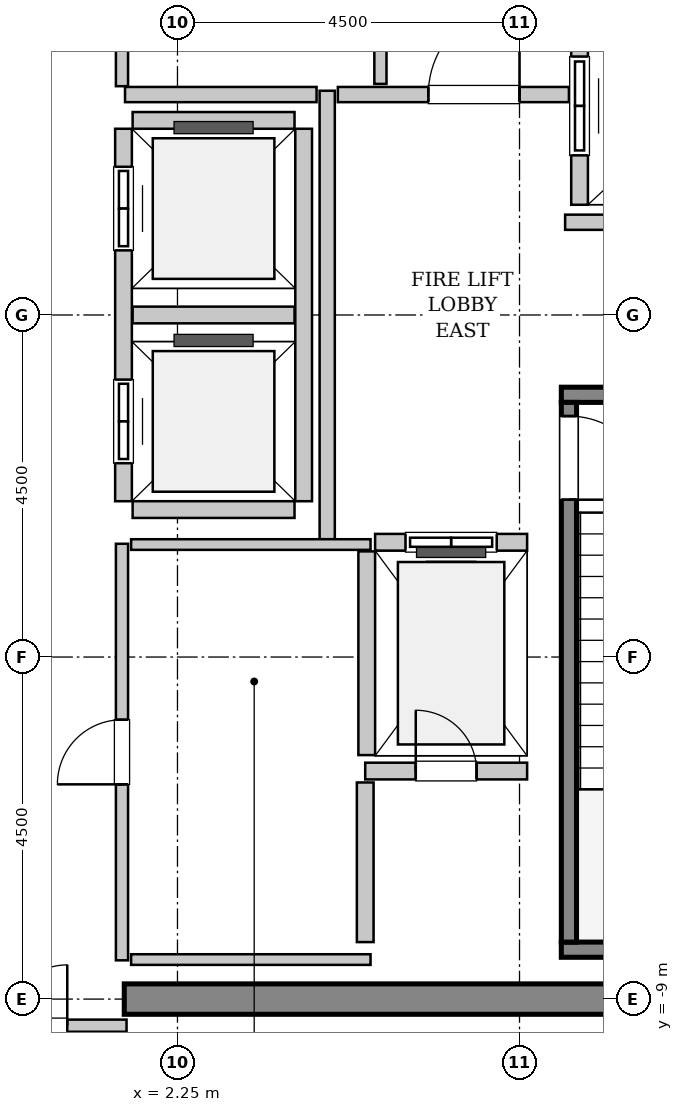
"""IFC4 building model, lengths in metres.
Left out: names, types, materials, properties, quantities, classifications, styles, units other than length and angle.
Written with IfcOpenShell. Run it as: python <this file> out.ifc"""

import sys

from ifc_helpers import new_model, si_unit, direction, frame, frame_2d, origin, place, context, subcontext, project, spatial, rectangle, extrude, source, transform, mapped, element, fill, save


model = new_model("IFC4")
c1 = context("Model", 3, precision=1e-05, world=origin(), true_north=direction((0.0, 1.0)))
c2 = subcontext(c1, "Body", "Model", "MODEL_VIEW")
j1 = project(units=[si_unit("LENGTHUNIT", "METRE"), si_unit("PLANEANGLEUNIT", "RADIAN")], contexts=[c1])
p1 = place(None, origin())
s1 = spatial("IfcSite", under=j1, at=p1, CompositionType="ELEMENT")
p2 = place(p1, origin())
s2 = spatial("IfcBuilding", under=s1, at=p2, CompositionType="ELEMENT")
p3 = place(p2, frame((0.0, 0.0, 353.8)))
s3 = spatial("IfcBuildingStorey", under=s2, at=p3, CompositionType="ELEMENT", Elevation=353.8)
m1 = source(origin(), c2, "Body", "SweptSolid", [
    extrude(rectangle(XDim=9.9, YDim=0.4, at=frame_2d((4.95, 0.0))), origin(), (0.0, 0.0, 1.0), 4.8),
])
p4 = place(p3, frame((1.55, -9.0, 0.0), z_axis=(0.0, 0.0, 1.0), x_axis=(1.0, 0.0, 0.0)))
e1 = element("IfcWall", 1, at=p4, inside=s3, PredefinedType="SHEAR", context=c2, shape_type="MappedRepresentation", body=[
    mapped(m1, transform((0.0, 0.0, 0.0), x_axis=(1.0, 0.0, 0.0), y_axis=(0.0, 1.0, 0.0), z_axis=(0.0, 0.0, 1.0), scale=1.0)),
])
m2 = source(origin(), c2, "Body", "SweptSolid", [
    extrude(rectangle(XDim=3.4, YDim=0.2, at=frame_2d((1.7, 0.0))), origin(), (0.0, 0.0, 1.0), 4.8),
])
p5 = place(p3, frame((7.3, -1.05, 0.0), z_axis=(0.0, 0.0, 1.0), x_axis=(1.0, 0.0, 0.0)))
e2 = element("IfcWall", 2, at=p5, inside=s3, PredefinedType="SOLIDWALL", context=c2, shape_type="MappedRepresentation", body=[
    mapped(m2, transform((0.0, 0.0, 0.0), x_axis=(1.0, 0.0, 0.0), y_axis=(0.0, 1.0, 0.0), z_axis=(0.0, 0.0, 1.0), scale=1.0)),
])
m3 = source(origin(), c2, "Body", "SweptSolid", [
    extrude(rectangle(XDim=3.755, YDim=0.2, at=frame_2d((1.877, 0.0))), origin(), (0.0, 0.0, 1.0), 4.8),
])
p6 = place(p3, frame((7.3, -8.35, 0.0), z_axis=(0.0, 0.0, 1.0), x_axis=(1.0, 0.0, 0.0)))
e3 = element("IfcWall", 3, at=p6, inside=s3, PredefinedType="SOLIDWALL", context=c2, shape_type="MappedRepresentation", body=[
    mapped(m3, transform((0.0, 0.0, 0.0), x_axis=(1.0, 0.0, 0.0), y_axis=(0.0, 1.0, 0.0), z_axis=(0.0, 0.0, 1.0), scale=1.0)),
])
m4 = source(origin(), c2, "Body", "SweptSolid", [
    extrude(rectangle(XDim=7.1, YDim=0.2, at=frame_2d((3.55, 0.0))), origin(), (0.0, 0.0, 1.0), 4.8),
])
p7 = place(p3, frame((7.4, -1.15, 0.0), z_axis=(0.0, 0.0, 1.0), x_axis=(0.0, -1.0, 0.0)))
e4 = element("IfcWall", 4, at=p7, inside=s3, PredefinedType="SOLIDWALL", context=c2, shape_type="MappedRepresentation", body=[
    mapped(m4, transform((0.0, 0.0, 0.0), x_axis=(1.0, 0.0, 0.0), y_axis=(0.0, 1.0, 0.0), z_axis=(0.0, 0.0, 1.0), scale=1.0)),
])
p8 = place(p7, frame((0.18, 0.0, 0.0)))
e5 = element("IfcOpeningElement", 5, at=p8, cuts=e4, PredefinedType="OPENING", context=c2, shape_type="SweptSolid", body=[
    extrude(rectangle(XDim=1.1, YDim=2.15, at=frame_2d((0.55, 1.075))), frame((0.0, 0.11, 0.0), z_axis=(0.0, -1.0, 0.0), x_axis=(1.0, 0.0, 0.0)), (0.0, 0.0, 1.0), 0.22),
])
m5 = source(origin(), c2, "Body", "SweptSolid", [
    extrude(rectangle(XDim=2.0, YDim=0.22, at=frame_2d((1.0, 0.0))), origin(), (0.0, 0.0, 1.0), 4.485),
])
p9 = place(p3, frame((6.85, -2.99, 0.0), z_axis=(0.0, 0.0, 1.0), x_axis=(-1.0, 0.0, 0.0)))
e6 = element("IfcWall", 6, at=p9, inside=s3, PredefinedType="SOLIDWALL", context=c2, shape_type="MappedRepresentation", body=[
    mapped(m5, transform((0.0, 0.0, 0.0), x_axis=(1.0, 0.0, 0.0), y_axis=(0.0, 1.0, 0.0), z_axis=(0.0, 0.0, 1.0), scale=1.0)),
])
p10 = place(p9, frame((0.4, 0.0, 0.0)))
e7 = element("IfcOpeningElement", 7, at=p10, cuts=e6, PredefinedType="OPENING", context=c2, shape_type="SweptSolid", body=[
    extrude(rectangle(XDim=1.2, YDim=2.2, at=frame_2d((0.6, 1.1))), frame((0.0, 0.12, 0.0), z_axis=(0.0, -1.0, 0.0), x_axis=(1.0, 0.0, 0.0)), (0.0, 0.0, 1.0), 0.24),
])
m6 = source(origin(), c2, "Body", "SweptSolid", [
    extrude(rectangle(XDim=2.68, YDim=0.22, at=frame_2d((1.34, 0.0))), origin(), (0.0, 0.0, 1.0), 4.485),
])
p11 = place(p3, frame((4.74, -3.11, 0.0), z_axis=(0.0, 0.0, 1.0), x_axis=(0.0, -1.0, 0.0)))
e8 = element("IfcWall", 8, at=p11, inside=s3, PredefinedType="SOLIDWALL", context=c2, shape_type="MappedRepresentation", body=[
    mapped(m6, transform((0.0, 0.0, 0.0), x_axis=(1.0, 0.0, 0.0), y_axis=(0.0, 1.0, 0.0), z_axis=(0.0, 0.0, 1.0), scale=1.0)),
])
m7 = source(origin(), c2, "Body", "SweptSolid", [
    extrude(rectangle(XDim=5.45, YDim=0.22, at=frame_2d((2.725, 0.0))), origin(), (0.0, 0.0, 1.0), 4.485),
])
p12 = place(p3, frame((7.54, 6.9, 0.0), z_axis=(0.0, 0.0, 1.0), x_axis=(0.0, -1.0, 0.0)))
e9 = element("IfcWall", 9, at=p12, inside=s3, PredefinedType="SOLIDWALL", context=c2, shape_type="MappedRepresentation", body=[
    mapped(m7, transform((0.0, 0.0, 0.0), x_axis=(1.0, 0.0, 0.0), y_axis=(0.0, 1.0, 0.0), z_axis=(0.0, 0.0, 1.0), scale=1.0)),
])
p13 = place(p12, frame((3.5, 0.0, 0.0)))
e10 = element("IfcOpeningElement", 10, at=p13, cuts=e9, PredefinedType="OPENING", context=c2, shape_type="SweptSolid", body=[
    extrude(rectangle(XDim=1.3, YDim=2.3, at=frame_2d((0.65, 1.15))), frame((0.0, 0.12, 0.0), z_axis=(0.0, -1.0, 0.0), x_axis=(1.0, 0.0, 0.0)), (0.0, 0.0, 1.0), 0.24),
])
p14 = place(p12, frame((0.65, 0.0, 0.0)))
e11 = element("IfcOpeningElement", 11, at=p14, cuts=e9, PredefinedType="OPENING", context=c2, shape_type="SweptSolid", body=[
    extrude(rectangle(XDim=1.3, YDim=2.3, at=frame_2d((0.65, 1.15))), frame((0.0, 0.12, 0.0), z_axis=(0.0, -1.0, 0.0), x_axis=(1.0, 0.0, 0.0)), (0.0, 0.0, 1.0), 0.24),
])
m8 = source(origin(), c2, "Body", "SweptSolid", [
    extrude(rectangle(XDim=4.9, YDim=0.22, at=frame_2d((2.45, 0.0))), origin(), (0.0, 0.0, 1.0), 4.485),
])
p15 = place(p3, frame((1.54, 2.45, 0.0), z_axis=(0.0, 0.0, 1.0), x_axis=(0.0, -1.0, 0.0)))
e12 = element("IfcWall", 12, at=p15, inside=s3, PredefinedType="SOLIDWALL", context=c2, shape_type="MappedRepresentation", body=[
    mapped(m8, transform((0.0, 0.0, 0.0), x_axis=(1.0, 0.0, 0.0), y_axis=(0.0, 1.0, 0.0), z_axis=(0.0, 0.0, 1.0), scale=1.0)),
])
p16 = place(p15, frame((3.3, 0.0, 0.0)))
e13 = element("IfcOpeningElement", 13, at=p16, cuts=e12, PredefinedType="OPENING", context=c2, shape_type="SweptSolid", body=[
    extrude(rectangle(XDim=1.1, YDim=2.2, at=frame_2d((0.55, 1.1))), frame((0.0, 0.12, 0.0), z_axis=(0.0, -1.0, 0.0), x_axis=(1.0, 0.0, 0.0)), (0.0, 0.0, 1.0), 0.24),
])
p17 = place(p15, frame((0.5, 0.0, 0.0)))
e14 = element("IfcOpeningElement", 14, at=p17, cuts=e12, PredefinedType="OPENING", context=c2, shape_type="SweptSolid", body=[
    extrude(rectangle(XDim=1.1, YDim=2.2, at=frame_2d((0.55, 1.1))), frame((0.0, 0.12, 0.0), z_axis=(0.0, -1.0, 0.0), x_axis=(1.0, 0.0, 0.0)), (0.0, 0.0, 1.0), 0.24),
])
p18 = place(p3, frame((3.91, -2.45, 0.0), z_axis=(0.0, 0.0, 1.0), x_axis=(0.0, 1.0, 0.0)))
e15 = element("IfcWall", 15, at=p18, inside=s3, PredefinedType="SOLIDWALL", context=c2, shape_type="MappedRepresentation", body=[
    mapped(m8, transform((0.0, 0.0, 0.0), x_axis=(1.0, 0.0, 0.0), y_axis=(0.0, 1.0, 0.0), z_axis=(0.0, 0.0, 1.0), scale=1.0)),
])
m9 = source(origin(), c2, "Body", "SweptSolid", [
    extrude(rectangle(XDim=2.13, YDim=0.22, at=frame_2d((1.065, 0.0))), origin(), (0.0, 0.0, 1.0), 4.485),
])
for number, where, z_axis, x_axis in (
    (16, (1.66, -2.56, 0.0), (0.0, 0.0, 1.0), (1.0, 0.0, 0.0)),
    (17, (1.66, 0.0, 0.0), (0.0, 0.0, 1.0), (1.0, 0.0, 0.0)),
    (18, (3.79, 2.56, 0.0), (0.0, 0.0, 1.0), (-1.0, 0.0, 0.0)),
):
    element("IfcWall", number, at=place(p3, frame(where, z_axis=z_axis, x_axis=x_axis)), inside=s3, PredefinedType="SOLIDWALL", context=c2, shape_type="MappedRepresentation", body=[
        mapped(m9, transform((0.0, 0.0, 0.0), x_axis=(1.0, 0.0, 0.0), y_axis=(0.0, 1.0, 0.0), z_axis=(0.0, 0.0, 1.0), scale=1.0)),
    ])
p19 = place(p3, frame((4.72, -6.0, 0.0), z_axis=(0.0, 0.0, 1.0), x_axis=(1.0, 0.0, 0.0)))
e19 = element("IfcWall", 19, at=p19, inside=s3, PredefinedType="SOLIDWALL", context=c2, shape_type="MappedRepresentation", body=[
    mapped(m9, transform((0.0, 0.0, 0.0), x_axis=(1.0, 0.0, 0.0), y_axis=(0.0, 1.0, 0.0), z_axis=(0.0, 0.0, 1.0), scale=1.0)),
])
p20 = place(p19, frame((0.665, 0.0, 0.0)))
e20 = element("IfcOpeningElement", 20, at=p20, cuts=e19, PredefinedType="OPENING", context=c2, shape_type="SweptSolid", body=[
    extrude(rectangle(XDim=0.8, YDim=2.0, at=frame_2d((0.4, 1.0))), frame((0.0, 0.12, 0.0), z_axis=(0.0, -1.0, 0.0), x_axis=(1.0, 0.0, 0.0)), (0.0, 0.0, 1.0), 0.24),
])
m10 = source(origin(), c2, "Body", "SweptSolid", [
    extrude(rectangle(XDim=2.1, YDim=0.22, at=frame_2d((1.05, 0.0))), origin(), (0.0, 0.0, 1.0), 4.485),
])
p21 = place(p3, frame((4.72, -8.25, 0.0), z_axis=(0.0, 0.0, 1.0), x_axis=(0.0, 1.0, 0.0)))
e21 = element("IfcWall", 21, at=p21, inside=s3, PredefinedType="SOLIDWALL", context=c2, shape_type="MappedRepresentation", body=[
    mapped(m10, transform((0.0, 0.0, 0.0), x_axis=(1.0, 0.0, 0.0), y_axis=(0.0, 1.0, 0.0), z_axis=(0.0, 0.0, 1.0), scale=1.0)),
])
m11 = source(origin(), c2, "Body", "SweptSolid", [
    extrude(rectangle(XDim=5.9, YDim=0.2, at=frame_2d((2.95, 0.0))), origin(), (0.0, 0.0, 1.0), 4.485),
])
p22 = place(p3, frame((4.22, -2.95, 0.0), z_axis=(0.0, 0.0, 1.0), x_axis=(0.0, 1.0, 0.0)))
e22 = element("IfcWall", 22, at=p22, inside=s3, PredefinedType="PARTITIONING", context=c2, shape_type="MappedRepresentation", body=[
    mapped(m11, transform((0.0, 0.0, 0.0), x_axis=(1.0, 0.0, 0.0), y_axis=(0.0, 1.0, 0.0), z_axis=(0.0, 0.0, 1.0), scale=1.0)),
])
m12 = source(origin(), c2, "Body", "SweptSolid", [
    extrude(rectangle(XDim=2.52, YDim=0.2, at=frame_2d((1.26, 0.0))), origin(), (0.0, 0.0, 1.0), 4.485),
])
p23 = place(p3, frame((1.56, 2.9, 0.0), z_axis=(0.0, 0.0, 1.0), x_axis=(1.0, 0.0, 0.0)))
e23 = element("IfcWall", 23, at=p23, inside=s3, PredefinedType="PARTITIONING", context=c2, shape_type="MappedRepresentation", body=[
    mapped(m12, transform((0.0, 0.0, 0.0), x_axis=(1.0, 0.0, 0.0), y_axis=(0.0, 1.0, 0.0), z_axis=(0.0, 0.0, 1.0), scale=1.0)),
])
m13 = source(origin(), c2, "Body", "SweptSolid", [
    extrude(rectangle(XDim=3.04, YDim=0.2, at=frame_2d((1.52, 0.0))), origin(), (0.0, 0.0, 1.0), 4.485),
])
p24 = place(p3, frame((4.36, 2.9, 0.0), z_axis=(0.0, 0.0, 1.0), x_axis=(1.0, 0.0, 0.0)))
e24 = element("IfcWall", 24, at=p24, inside=s3, PredefinedType="PARTITIONING", context=c2, shape_type="MappedRepresentation", body=[
    mapped(m13, transform((0.0, 0.0, 0.0), x_axis=(1.0, 0.0, 0.0), y_axis=(0.0, 1.0, 0.0), z_axis=(0.0, 0.0, 1.0), scale=1.0)),
])
p25 = place(p24, frame((1.19, 0.0, 0.0)))
e25 = element("IfcOpeningElement", 25, at=p25, cuts=e24, PredefinedType="OPENING", context=c2, shape_type="SweptSolid", body=[
    extrude(rectangle(XDim=1.2, YDim=2.15, at=frame_2d((0.6, 1.075))), frame((0.0, 0.11, 0.0), z_axis=(0.0, -1.0, 0.0), x_axis=(1.0, 0.0, 0.0)), (0.0, 0.0, 1.0), 0.22),
])
m14 = source(origin(), c2, "Body", "SweptSolid", [
    extrude(rectangle(XDim=4.11, YDim=0.2, at=frame_2d((2.055, 0.0))), origin(), (0.0, 0.0, 1.0), 4.485),
])
p26 = place(p3, frame((7.35, 1.22, 0.0), z_axis=(0.0, 0.0, 1.0), x_axis=(1.0, 0.0, 0.0)))
e26 = element("IfcWall", 26, at=p26, inside=s3, PredefinedType="PARTITIONING", context=c2, shape_type="MappedRepresentation", body=[
    mapped(m14, transform((0.0, 0.0, 0.0), x_axis=(1.0, 0.0, 0.0), y_axis=(0.0, 1.0, 0.0), z_axis=(0.0, 0.0, 1.0), scale=1.0)),
])
m15 = source(origin(), c2, "Body", "SweptSolid", [
    extrude(rectangle(XDim=3.16, YDim=0.16, at=frame_2d((1.58, 0.0))), origin(), (0.0, 0.0, 1.0), 3.575),
])
p27 = place(p3, frame((-1.58, -9.35, 0.0), z_axis=(0.0, 0.0, 1.0), x_axis=(1.0, 0.0, 0.0)))
e27 = element("IfcWall", 27, at=p27, inside=s3, PredefinedType="PARTITIONING", context=c2, shape_type="MappedRepresentation", body=[
    mapped(m15, transform((0.0, 0.0, 0.0), x_axis=(1.0, 0.0, 0.0), y_axis=(0.0, 1.0, 0.0), z_axis=(0.0, 0.0, 1.0), scale=1.0)),
])
p28 = place(p27, frame((0.78, 0.0, 0.0)))
e28 = element("IfcOpeningElement", 28, at=p28, cuts=e27, PredefinedType="OPENING", context=c2, shape_type="SweptSolid", body=[
    extrude(rectangle(XDim=1.6, YDim=2.3, at=frame_2d((0.8, 1.15))), frame((0.0, 0.09, 0.0), z_axis=(0.0, -1.0, 0.0), x_axis=(1.0, 0.0, 0.0)), (0.0, 0.0, 1.0), 0.18),
])
m16 = source(origin(), c2, "Body", "SweptSolid", [
    extrude(rectangle(XDim=5.45, YDim=0.16, at=frame_2d((2.725, 0.0))), origin(), (0.0, 0.0, 1.0), 4.485),
])
p29 = place(p3, frame((4.92, 3.04, 0.0), z_axis=(0.0, 0.0, 1.0), x_axis=(0.0, 1.0, 0.0)))
e29 = element("IfcWall", 29, at=p29, inside=s3, PredefinedType="PARTITIONING", context=c2, shape_type="MappedRepresentation", body=[
    mapped(m16, transform((0.0, 0.0, 0.0), x_axis=(1.0, 0.0, 0.0), y_axis=(0.0, 1.0, 0.0), z_axis=(0.0, 0.0, 1.0), scale=1.0)),
])
m17 = source(origin(), c2, "Body", "SweptSolid", [
    extrude(rectangle(XDim=5.48, YDim=0.16, at=frame_2d((2.74, 0.0))), origin(), (0.0, 0.0, 1.0), 4.485),
])
p30 = place(p3, frame((1.52, 3.01, 0.0), z_axis=(0.0, 0.0, 1.0), x_axis=(0.0, 1.0, 0.0)))
e30 = element("IfcWall", 30, at=p30, inside=s3, PredefinedType="PARTITIONING", context=c2, shape_type="MappedRepresentation", body=[
    mapped(m17, transform((0.0, 0.0, 0.0), x_axis=(1.0, 0.0, 0.0), y_axis=(0.0, 1.0, 0.0), z_axis=(0.0, 0.0, 1.0), scale=1.0)),
])
p31 = place(p30, frame((2.315, 0.0, 0.0)))
e31 = element("IfcOpeningElement", 31, at=p31, cuts=e30, PredefinedType="OPENING", context=c2, shape_type="SweptSolid", body=[
    extrude(rectangle(XDim=0.85, YDim=2.1, at=frame_2d((0.425, 1.05))), frame((0.0, 0.09, 0.0), z_axis=(0.0, -1.0, 0.0), x_axis=(1.0, 0.0, 0.0)), (0.0, 0.0, 1.0), 0.18),
])
p32 = place(p3, frame((1.52, -8.49, 0.0), z_axis=(0.0, 0.0, 1.0), x_axis=(0.0, 1.0, 0.0)))
e32 = element("IfcWall", 32, at=p32, inside=s3, PredefinedType="PARTITIONING", context=c2, shape_type="MappedRepresentation", body=[
    mapped(m17, transform((0.0, 0.0, 0.0), x_axis=(1.0, 0.0, 0.0), y_axis=(0.0, 1.0, 0.0), z_axis=(0.0, 0.0, 1.0), scale=1.0)),
])
p33 = place(p32, frame((2.315, 0.0, 0.0)))
e33 = element("IfcOpeningElement", 33, at=p33, cuts=e32, PredefinedType="OPENING", context=c2, shape_type="SweptSolid", body=[
    extrude(rectangle(XDim=0.85, YDim=2.1, at=frame_2d((0.425, 1.05))), frame((0.0, 0.09, 0.0), z_axis=(0.0, -1.0, 0.0), x_axis=(1.0, 0.0, 0.0)), (0.0, 0.0, 1.0), 0.18),
])
m18 = source(origin(), c2, "Body", "SweptSolid", [
    extrude(rectangle(XDim=3.15, YDim=0.14, at=frame_2d((1.575, 0.0))), origin(), (0.0, 0.0, 1.0), 4.485),
])
for number, where, z_axis, x_axis in (
    (34, (1.64, -3.02, 0.0), (0.0, 0.0, 1.0), (1.0, 0.0, 0.0)),
    (35, (1.64, -8.48, 0.0), (0.0, 0.0, 1.0), (1.0, 0.0, 0.0)),
):
    element("IfcWall", number, at=place(p3, frame(where, z_axis=z_axis, x_axis=x_axis)), inside=s3, PredefinedType="PARTITIONING", context=c2, shape_type="MappedRepresentation", body=[
        mapped(m18, transform((0.0, 0.0, 0.0), x_axis=(1.0, 0.0, 0.0), y_axis=(0.0, 1.0, 0.0), z_axis=(0.0, 0.0, 1.0), scale=1.0)),
    ])
m19 = source(origin(), c2, "Body", "SweptSolid", [
    extrude(rectangle(XDim=1.1, YDim=2.15, at=frame_2d((0.55, 1.075))), frame((0.0, 0.025, 0.0), z_axis=(0.0, -1.0, 0.0), x_axis=(1.0, 0.0, 0.0)), (0.0, 0.0, 1.0), 0.05),
])
p34 = place(p8, origin())
e36 = element("IfcDoor", 36, at=p34, inside=s3, OperationType="SINGLE_SWING_RIGHT", PredefinedType="DOOR", context=c2, shape_type="MappedRepresentation", body=[
    mapped(m19, transform((0.0, 0.0, 0.0), x_axis=(1.0, 0.0, 0.0), y_axis=(0.0, 1.0, 0.0), z_axis=(0.0, 0.0, 1.0), scale=1.0)),
])
fill(e5, e36)
m20 = source(origin(), c2, "Body", "SweptSolid", [
    extrude(rectangle(XDim=1.2, YDim=2.2, at=frame_2d((0.6, 1.1))), frame((0.0, 0.025, 0.0), z_axis=(0.0, -1.0, 0.0), x_axis=(1.0, 0.0, 0.0)), (0.0, 0.0, 1.0), 0.05),
])
p35 = place(p10, origin())
e37 = element("IfcDoor", 37, at=p35, inside=s3, OperationType="SLIDING_TO_LEFT", PredefinedType="DOOR", context=c2, shape_type="MappedRepresentation", body=[
    mapped(m20, transform((0.0, 0.0, 0.0), x_axis=(1.0, 0.0, 0.0), y_axis=(0.0, 1.0, 0.0), z_axis=(0.0, 0.0, 1.0), scale=1.0)),
])
fill(e7, e37)
m21 = source(origin(), c2, "Body", "SweptSolid", [
    extrude(rectangle(XDim=1.3, YDim=2.3, at=frame_2d((0.65, 1.15))), frame((0.0, 0.025, 0.0), z_axis=(0.0, -1.0, 0.0), x_axis=(1.0, 0.0, 0.0)), (0.0, 0.0, 1.0), 0.05),
])
p36 = place(p13, origin())
e38 = element("IfcDoor", 38, at=p36, inside=s3, OperationType="SLIDING_TO_RIGHT", PredefinedType="DOOR", context=c2, shape_type="MappedRepresentation", body=[
    mapped(m21, transform((0.0, 0.0, 0.0), x_axis=(1.0, 0.0, 0.0), y_axis=(0.0, 1.0, 0.0), z_axis=(0.0, 0.0, 1.0), scale=1.0)),
])
fill(e10, e38)
m22 = source(origin(), c2, "Body", "SweptSolid", [
    extrude(rectangle(XDim=1.1, YDim=2.2, at=frame_2d((0.55, 1.1))), frame((0.0, 0.025, 0.0), z_axis=(0.0, -1.0, 0.0), x_axis=(1.0, 0.0, 0.0)), (0.0, 0.0, 1.0), 0.05),
])
p37 = place(p16, origin())
e39 = element("IfcDoor", 39, at=p37, inside=s3, OperationType="DOUBLE_DOOR_SLIDING", PredefinedType="DOOR", context=c2, shape_type="MappedRepresentation", body=[
    mapped(m22, transform((0.0, 0.0, 0.0), x_axis=(1.0, 0.0, 0.0), y_axis=(0.0, 1.0, 0.0), z_axis=(0.0, 0.0, 1.0), scale=1.0)),
])
fill(e13, e39)
p38 = place(p17, origin())
e40 = element("IfcDoor", 40, at=p38, inside=s3, OperationType="DOUBLE_DOOR_SLIDING", PredefinedType="DOOR", context=c2, shape_type="MappedRepresentation", body=[
    mapped(m22, transform((0.0, 0.0, 0.0), x_axis=(1.0, 0.0, 0.0), y_axis=(0.0, 1.0, 0.0), z_axis=(0.0, 0.0, 1.0), scale=1.0)),
])
fill(e14, e40)
m23 = source(origin(), c2, "Body", "SweptSolid", [
    extrude(rectangle(XDim=0.8, YDim=2.0, at=frame_2d((0.4, 1.0))), frame((0.0, 0.025, 0.0), z_axis=(0.0, -1.0, 0.0), x_axis=(1.0, 0.0, 0.0)), (0.0, 0.0, 1.0), 0.05),
])
p39 = place(p20, origin())
e41 = element("IfcDoor", 41, at=p39, inside=s3, OperationType="SINGLE_SWING_LEFT", PredefinedType="TRAPDOOR", context=c2, shape_type="MappedRepresentation", body=[
    mapped(m23, transform((0.0, 0.0, 0.0), x_axis=(1.0, 0.0, 0.0), y_axis=(0.0, 1.0, 0.0), z_axis=(0.0, 0.0, 1.0), scale=1.0)),
])
fill(e20, e41)
m24 = source(origin(), c2, "Body", "SweptSolid", [
    extrude(rectangle(XDim=1.2, YDim=2.15, at=frame_2d((0.6, 1.075))), frame((0.0, 0.025, 0.0), z_axis=(0.0, -1.0, 0.0), x_axis=(1.0, 0.0, 0.0)), (0.0, 0.0, 1.0), 0.05),
])
p40 = place(p25, origin())
e42 = element("IfcDoor", 42, at=p40, inside=s3, OperationType="SINGLE_SWING_RIGHT", PredefinedType="DOOR", context=c2, shape_type="MappedRepresentation", body=[
    mapped(m24, transform((0.0, 0.0, 0.0), x_axis=(1.0, 0.0, 0.0), y_axis=(0.0, 1.0, 0.0), z_axis=(0.0, 0.0, 1.0), scale=1.0)),
])
fill(e25, e42)
m25 = source(origin(), c2, "Body", "SweptSolid", [
    extrude(rectangle(XDim=1.6, YDim=2.3, at=frame_2d((0.8, 1.15))), frame((0.0, 0.025, 0.0), z_axis=(0.0, -1.0, 0.0), x_axis=(1.0, 0.0, 0.0)), (0.0, 0.0, 1.0), 0.05),
])
p41 = place(p28, origin())
e43 = element("IfcDoor", 43, at=p41, inside=s3, OperationType="DOUBLE_DOOR_SINGLE_SWING", PredefinedType="DOOR", context=c2, shape_type="MappedRepresentation", body=[
    mapped(m25, transform((0.0, 0.0, 0.0), x_axis=(1.0, 0.0, 0.0), y_axis=(0.0, 1.0, 0.0), z_axis=(0.0, 0.0, 1.0), scale=1.0)),
])
fill(e28, e43)
m26 = source(origin(), c2, "Body", "SweptSolid", [
    extrude(rectangle(XDim=0.85, YDim=2.1, at=frame_2d((0.425, 1.05))), frame((0.0, 0.025, 0.0), z_axis=(0.0, -1.0, 0.0), x_axis=(1.0, 0.0, 0.0)), (0.0, 0.0, 1.0), 0.05),
])
p42 = place(p33, origin())
e44 = element("IfcDoor", 44, at=p42, inside=s3, OperationType="SINGLE_SWING_LEFT", PredefinedType="DOOR", context=c2, shape_type="MappedRepresentation", body=[
    mapped(m26, transform((0.0, 0.0, 0.0), x_axis=(1.0, 0.0, 0.0), y_axis=(0.0, 1.0, 0.0), z_axis=(0.0, 0.0, 1.0), scale=1.0)),
])
fill(e33, e44)
save(model, sys.argv[1])
